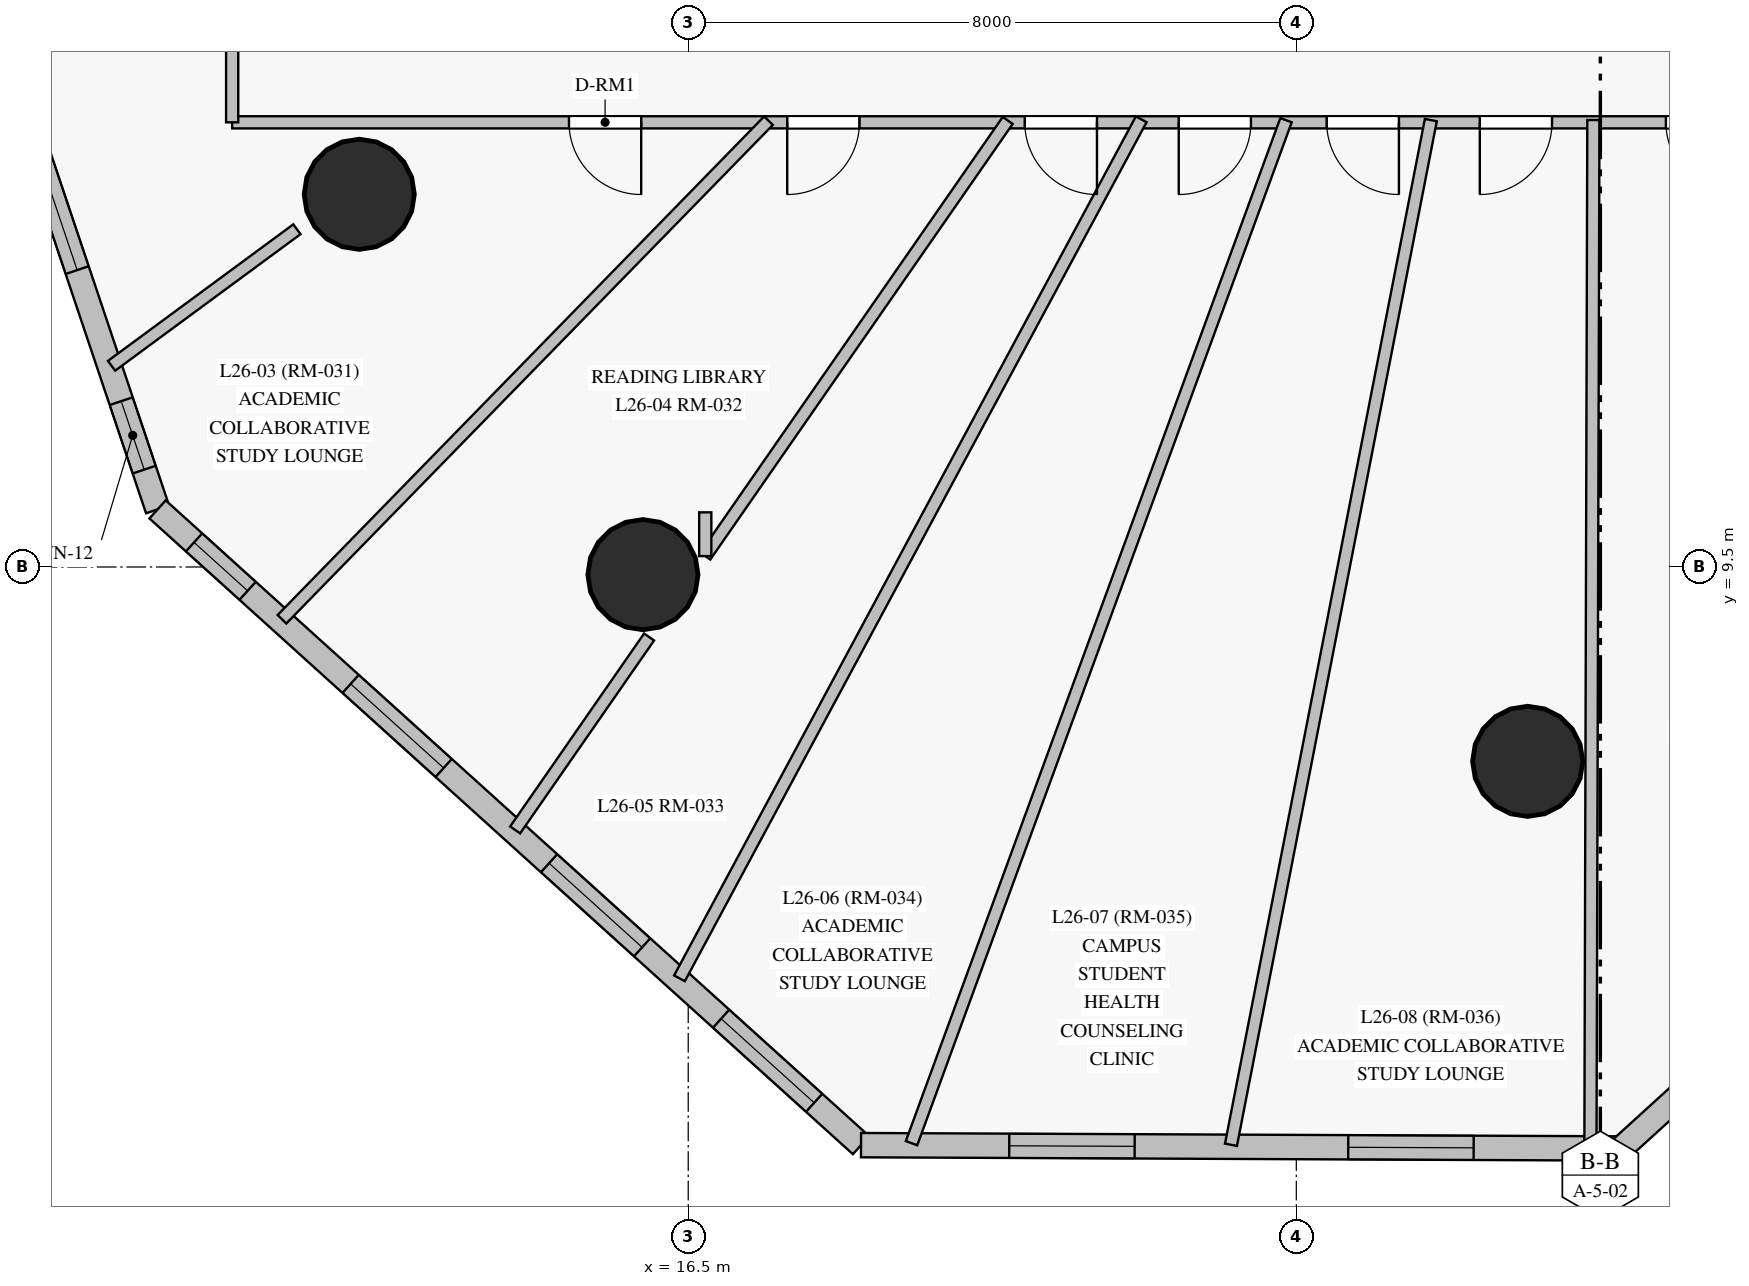
"""IFC4 building model, lengths in metres.
Left out: names, types, materials, properties, quantities, classifications, styles, units other than length and angle.
Written with IfcOpenShell. Run it as: python <this file> out.ifc"""

import sys

from ifc_helpers import new_model, si_unit, direction, frame, frame_2d, origin, origin_with_axes, origin_2d, place, context, subcontext, project, spatial, rectangle, circle, extrude, source, transform, mapped, element, fill, save


model = new_model("IFC4")
c1 = context("Model", 3, precision=1e-05, world=origin(), true_north=direction((0.0, 1.0)))
c2 = subcontext(c1, "Body", "Model", "MODEL_VIEW")
j1 = project(units=[si_unit("LENGTHUNIT", "METRE"), si_unit("PLANEANGLEUNIT", "RADIAN")], contexts=[c1])
p1 = place(None, origin())
s1 = spatial("IfcSite", under=j1, at=p1, CompositionType="ELEMENT")
p2 = place(p1, origin())
s2 = spatial("IfcBuilding", under=s1, at=p2, CompositionType="ELEMENT")
p3 = place(p2, frame((0.0, 0.0, 99.25)))
s3 = spatial("IfcBuildingStorey", under=s2, at=p3, CompositionType="ELEMENT", Elevation=99.25)
m1 = source(origin_with_axes(), c2, "Body", "SweptSolid", [
    extrude(circle(Radius=0.725, at=origin_2d()), origin(), (0.0, 0.0, 1.0), 3.05),
])
for number, where, z_axis, x_axis in (
    (1, (12.172, 14.403, 0.0), (0.0, 0.0, 1.0), (1.0, 0.0, 0.0)),
    (2, (15.904, 9.399, 0.0), (0.0, 0.0, 1.0), (1.0, 0.0, 0.0)),
    (3, (27.544, 6.943, 0.0), (0.0, 0.0, 1.0), (1.0, 0.0, 0.0)),
):
    element("IfcColumn", number, at=place(p3, frame(where, z_axis=z_axis, x_axis=x_axis)), inside=s3, PredefinedType="COLUMN", context=c2, shape_type="MappedRepresentation", body=[
        mapped(m1, transform((0.0, 0.0, 0.0), scale=1.0)),
    ])
p4 = place(p3, frame((6.327, 19.757, 0.0), z_axis=(0.0, 0.0, 1.0), x_axis=(0.318478051642, -0.947930235103, 0.0)))
e4 = element("IfcWall", 4, at=p4, inside=s3, PredefinedType="SOLIDWALL", context=c2, shape_type="SweptSolid", body=[
    extrude(rectangle(XDim=10.021, YDim=0.32, at=frame_2d((5.01, 0.0))), origin(), (0.0, 0.0, 1.0), 2.825),
])
p5 = place(p4, frame((1.387, 0.0, 0.85)))
e5 = element("IfcOpeningElement", 5, at=p5, cuts=e4, PredefinedType="OPENING", context=c2, shape_type="SweptSolid", body=[
    extrude(rectangle(XDim=1.65, YDim=1.65, at=frame_2d((0.825, 0.825))), frame((0.0, 0.17, 0.0), z_axis=(0.0, -1.0, 0.0), x_axis=(1.0, 0.0, 0.0)), (0.0, 0.0, 1.0), 0.34),
])
p6 = place(p4, frame((5.05, 0.0, 0.85)))
e6 = element("IfcOpeningElement", 6, at=p6, cuts=e4, PredefinedType="OPENING", context=c2, shape_type="SweptSolid", body=[
    extrude(rectangle(XDim=1.65, YDim=1.65, at=frame_2d((0.825, 0.825))), frame((0.0, 0.17, 0.0), z_axis=(0.0, -1.0, 0.0), x_axis=(1.0, 0.0, 0.0)), (0.0, 0.0, 1.0), 0.34),
])
p7 = place(p4, frame((8.519, 0.0, 0.85)))
e7 = element("IfcOpeningElement", 7, at=p7, cuts=e4, PredefinedType="OPENING", context=c2, shape_type="SweptSolid", body=[
    extrude(rectangle(XDim=0.95, YDim=1.5, at=frame_2d((0.475, 0.75))), frame((0.0, 0.17, 0.0), z_axis=(0.0, -1.0, 0.0), x_axis=(1.0, 0.0, 0.0)), (0.0, 0.0, 1.0), 0.34),
])
p8 = place(p3, frame((9.519, 10.258, 0.0), z_axis=(0.0, 0.0, 1.0), x_axis=(0.74192235479, -0.670485808547, 0.0)))
e8 = element("IfcWall", 8, at=p8, inside=s3, PredefinedType="SOLIDWALL", context=c2, shape_type="SweptSolid", body=[
    extrude(rectangle(XDim=12.474, YDim=0.32, at=frame_2d((6.237, 0.0))), origin(), (0.0, 0.0, 1.0), 2.825),
])
p9 = place(p8, frame((0.647, 0.0, 0.85)))
e9 = element("IfcOpeningElement", 9, at=p9, cuts=e8, PredefinedType="OPENING", context=c2, shape_type="SweptSolid", body=[
    extrude(rectangle(XDim=0.95, YDim=1.5, at=frame_2d((0.475, 0.75))), frame((0.0, 0.17, 0.0), z_axis=(0.0, -1.0, 0.0), x_axis=(1.0, 0.0, 0.0)), (0.0, 0.0, 1.0), 0.34),
])
p10 = place(p8, frame((3.424, 0.0, 0.85)))
e10 = element("IfcOpeningElement", 10, at=p10, cuts=e8, PredefinedType="OPENING", context=c2, shape_type="SweptSolid", body=[
    extrude(rectangle(XDim=1.65, YDim=1.65, at=frame_2d((0.825, 0.825))), frame((0.0, 0.17, 0.0), z_axis=(0.0, -1.0, 0.0), x_axis=(1.0, 0.0, 0.0)), (0.0, 0.0, 1.0), 0.34),
])
p11 = place(p8, frame((6.943, 0.0, 0.85)))
e11 = element("IfcOpeningElement", 11, at=p11, cuts=e8, PredefinedType="OPENING", context=c2, shape_type="SweptSolid", body=[
    extrude(rectangle(XDim=1.65, YDim=1.65, at=frame_2d((0.825, 0.825))), frame((0.0, 0.17, 0.0), z_axis=(0.0, -1.0, 0.0), x_axis=(1.0, 0.0, 0.0)), (0.0, 0.0, 1.0), 0.34),
])
p12 = place(p8, frame((9.993, 0.0, 0.85)))
e12 = element("IfcOpeningElement", 12, at=p12, cuts=e8, PredefinedType="OPENING", context=c2, shape_type="SweptSolid", body=[
    extrude(rectangle(XDim=1.65, YDim=1.65, at=frame_2d((0.825, 0.825))), frame((0.0, 0.17, 0.0), z_axis=(0.0, -1.0, 0.0), x_axis=(1.0, 0.0, 0.0)), (0.0, 0.0, 1.0), 0.34),
])
p13 = place(p3, frame((18.773, 1.894, 0.0), z_axis=(0.0, 0.0, 1.0), x_axis=(0.999990449776, -0.004370395549, 0.0)))
e13 = element("IfcWall", 13, at=p13, inside=s3, PredefinedType="SOLIDWALL", context=c2, shape_type="SweptSolid", body=[
    extrude(rectangle(XDim=9.999, YDim=0.32, at=frame_2d((5.0, 0.0))), origin(), (0.0, 0.0, 1.0), 2.825),
])
p14 = place(p13, frame((1.95, 0.0, 0.85)))
e14 = element("IfcOpeningElement", 14, at=p14, cuts=e13, PredefinedType="OPENING", context=c2, shape_type="SweptSolid", body=[
    extrude(rectangle(XDim=1.65, YDim=1.65, at=frame_2d((0.825, 0.825))), frame((0.0, 0.17, 0.0), z_axis=(0.0, -1.0, 0.0), x_axis=(1.0, 0.0, 0.0)), (0.0, 0.0, 1.0), 0.34),
])
p15 = place(p13, frame((6.41, 0.0, 0.85)))
e15 = element("IfcOpeningElement", 15, at=p15, cuts=e13, PredefinedType="OPENING", context=c2, shape_type="SweptSolid", body=[
    extrude(rectangle(XDim=1.65, YDim=1.65, at=frame_2d((0.825, 0.825))), frame((0.0, 0.17, 0.0), z_axis=(0.0, -1.0, 0.0), x_axis=(1.0, 0.0, 0.0)), (0.0, 0.0, 1.0), 0.34),
])
p16 = place(p3, frame((28.773, 1.85, 0.0), z_axis=(0.0, 0.0, 1.0), x_axis=(0.739889815612, 0.672728073409, 0.0)))
e16 = element("IfcWall", 16, at=p16, inside=s3, PredefinedType="SOLIDWALL", context=c2, shape_type="SweptSolid", body=[
    extrude(rectangle(XDim=14.948, YDim=0.32, at=frame_2d((7.474, 0.0))), origin(), (0.0, 0.0, 1.0), 2.825),
])
p17 = place(p16, frame((2.629, 0.0, 0.85)))
e17 = element("IfcOpeningElement", 17, at=p17, cuts=e16, PredefinedType="OPENING", context=c2, shape_type="SweptSolid", body=[
    extrude(rectangle(XDim=1.65, YDim=1.65, at=frame_2d((0.825, 0.825))), frame((0.0, 0.17, 0.0), z_axis=(0.0, -1.0, 0.0), x_axis=(1.0, 0.0, 0.0)), (0.0, 0.0, 1.0), 0.34),
])
p18 = place(p16, frame((8.063, 0.0, 0.85)))
e18 = element("IfcOpeningElement", 18, at=p18, cuts=e16, PredefinedType="OPENING", context=c2, shape_type="SweptSolid", body=[
    extrude(rectangle(XDim=1.65, YDim=1.65, at=frame_2d((0.825, 0.825))), frame((0.0, 0.17, 0.0), z_axis=(0.0, -1.0, 0.0), x_axis=(1.0, 0.0, 0.0)), (0.0, 0.0, 1.0), 0.34),
])
p19 = place(p16, frame((11.502, 0.0, 0.85)))
e19 = element("IfcOpeningElement", 19, at=p19, cuts=e16, PredefinedType="OPENING", context=c2, shape_type="SweptSolid", body=[
    extrude(rectangle(XDim=1.65, YDim=1.65, at=frame_2d((0.825, 0.825))), frame((0.0, 0.17, 0.0), z_axis=(0.0, -1.0, 0.0), x_axis=(1.0, 0.0, 0.0)), (0.0, 0.0, 1.0), 0.34),
])
p20 = place(p3, frame((40.25, 15.35, 0.0), z_axis=(0.0, 0.0, 1.0), x_axis=(-1.0, 0.0, 0.0)))
e20 = element("IfcWall", 20, at=p20, inside=s3, PredefinedType="PARTITIONING", context=c2, shape_type="SweptSolid", body=[
    extrude(rectangle(XDim=29.75, YDim=0.16, at=frame_2d((14.875, 0.0))), origin(), (0.0, 0.0, 1.0), 2.225),
])
p21 = place(p20, frame((24.369, 0.0, 0.0)))
e21 = element("IfcOpeningElement", 21, at=p21, cuts=e20, PredefinedType="OPENING", context=c2, shape_type="SweptSolid", body=[
    extrude(rectangle(XDim=0.95, YDim=2.15, at=frame_2d((0.475, 1.075))), frame((0.0, 0.09, 0.0), z_axis=(0.0, -1.0, 0.0), x_axis=(1.0, 0.0, 0.0)), (0.0, 0.0, 1.0), 0.18),
])
p22 = place(p20, frame((21.498, 0.0, 0.0)))
e22 = element("IfcOpeningElement", 22, at=p22, cuts=e20, PredefinedType="OPENING", context=c2, shape_type="SweptSolid", body=[
    extrude(rectangle(XDim=0.95, YDim=2.15, at=frame_2d((0.475, 1.075))), frame((0.0, 0.09, 0.0), z_axis=(0.0, -1.0, 0.0), x_axis=(1.0, 0.0, 0.0)), (0.0, 0.0, 1.0), 0.18),
])
p23 = place(p20, frame((18.373, 0.0, 0.0)))
e23 = element("IfcOpeningElement", 23, at=p23, cuts=e20, PredefinedType="OPENING", context=c2, shape_type="SweptSolid", body=[
    extrude(rectangle(XDim=0.95, YDim=2.15, at=frame_2d((0.475, 1.075))), frame((0.0, 0.09, 0.0), z_axis=(0.0, -1.0, 0.0), x_axis=(1.0, 0.0, 0.0)), (0.0, 0.0, 1.0), 0.18),
])
p24 = place(p20, frame((16.347, 0.0, 0.0)))
e24 = element("IfcOpeningElement", 24, at=p24, cuts=e20, PredefinedType="OPENING", context=c2, shape_type="SweptSolid", body=[
    extrude(rectangle(XDim=0.95, YDim=2.15, at=frame_2d((0.475, 1.075))), frame((0.0, 0.09, 0.0), z_axis=(0.0, -1.0, 0.0), x_axis=(1.0, 0.0, 0.0)), (0.0, 0.0, 1.0), 0.18),
])
p25 = place(p20, frame((14.4, 0.0, 0.0)))
e25 = element("IfcOpeningElement", 25, at=p25, cuts=e20, PredefinedType="OPENING", context=c2, shape_type="SweptSolid", body=[
    extrude(rectangle(XDim=0.95, YDim=2.15, at=frame_2d((0.475, 1.075))), frame((0.0, 0.09, 0.0), z_axis=(0.0, -1.0, 0.0), x_axis=(1.0, 0.0, 0.0)), (0.0, 0.0, 1.0), 0.18),
])
p26 = place(p20, frame((12.386, 0.0, 0.0)))
e26 = element("IfcOpeningElement", 26, at=p26, cuts=e20, PredefinedType="OPENING", context=c2, shape_type="SweptSolid", body=[
    extrude(rectangle(XDim=0.95, YDim=2.15, at=frame_2d((0.475, 1.075))), frame((0.0, 0.09, 0.0), z_axis=(0.0, -1.0, 0.0), x_axis=(1.0, 0.0, 0.0)), (0.0, 0.0, 1.0), 0.18),
])
p27 = place(p20, frame((9.938, 0.0, 0.0)))
e27 = element("IfcOpeningElement", 27, at=p27, cuts=e20, PredefinedType="OPENING", context=c2, shape_type="SweptSolid", body=[
    extrude(rectangle(XDim=0.95, YDim=2.15, at=frame_2d((0.475, 1.075))), frame((0.0, 0.09, 0.0), z_axis=(0.0, -1.0, 0.0), x_axis=(1.0, 0.0, 0.0)), (0.0, 0.0, 1.0), 0.18),
])
p28 = place(p20, frame((6.962, 0.0, 0.0)))
e28 = element("IfcOpeningElement", 28, at=p28, cuts=e20, PredefinedType="OPENING", context=c2, shape_type="SweptSolid", body=[
    extrude(rectangle(XDim=0.95, YDim=2.15, at=frame_2d((0.475, 1.075))), frame((0.0, 0.09, 0.0), z_axis=(0.0, -1.0, 0.0), x_axis=(1.0, 0.0, 0.0)), (0.0, 0.0, 1.0), 0.18),
])
p29 = place(p3, frame((10.5, 15.35, 0.0), z_axis=(0.0, 0.0, 1.0), x_axis=(0.0, 1.0, 0.0)))
e29 = element("IfcWall", 29, at=p29, inside=s3, PredefinedType="PARTITIONING", context=c2, shape_type="SweptSolid", body=[
    extrude(rectangle(XDim=22.138, YDim=0.16, at=frame_2d((11.069, 0.0))), origin(), (0.0, 0.0, 1.0), 2.825),
])
p30 = place(p29, frame((5.021, 0.0, 0.0)))
e30 = element("IfcOpeningElement", 30, at=p30, cuts=e29, PredefinedType="OPENING", context=c2, shape_type="SweptSolid", body=[
    extrude(rectangle(XDim=0.96, YDim=2.15, at=frame_2d((0.48, 1.075))), frame((0.0, 0.09, 0.0), z_axis=(0.0, -1.0, 0.0), x_axis=(1.0, 0.0, 0.0)), (0.0, 0.0, 1.0), 0.18),
])
p31 = place(p29, frame((10.518, 0.0, 0.0)))
e31 = element("IfcOpeningElement", 31, at=p31, cuts=e29, PredefinedType="OPENING", context=c2, shape_type="SweptSolid", body=[
    extrude(rectangle(XDim=0.95, YDim=2.15, at=frame_2d((0.475, 1.075))), frame((0.0, 0.09, 0.0), z_axis=(0.0, -1.0, 0.0), x_axis=(1.0, 0.0, 0.0)), (0.0, 0.0, 1.0), 0.18),
])
p32 = place(p3, frame((24.365, 15.378, 0.0), z_axis=(0.0, 0.0, 1.0), x_axis=(-0.343761077949, -0.939057144847, 0.0)))
e32 = element("IfcWall", 32, at=p32, inside=s3, PredefinedType="PARTITIONING", context=c2, shape_type="SweptSolid", body=[
    extrude(rectangle(XDim=14.332, YDim=0.16, at=frame_2d((7.166, 0.0))), origin(), (0.0, 0.0, 1.0), 2.825),
])
p33 = place(p3, frame((26.27, 15.379, 0.0), z_axis=(0.0, 0.0, 1.0), x_axis=(-0.191458153646, -0.981500777077, 0.0)))
e33 = element("IfcWall", 33, at=p33, inside=s3, PredefinedType="PARTITIONING", context=c2, shape_type="SweptSolid", body=[
    extrude(rectangle(XDim=13.735, YDim=0.16, at=frame_2d((6.867, 0.0))), origin(), (0.0, 0.0, 1.0), 2.225),
])
p34 = place(p3, frame((28.408, 15.38, 0.0), z_axis=(0.0, 0.0, 1.0), x_axis=(-0.002856666281, -0.999995919721, 0.0)))
e34 = element("IfcWall", 34, at=p34, inside=s3, PredefinedType="PARTITIONING", context=c2, shape_type="SweptSolid", body=[
    extrude(rectangle(XDim=13.503, YDim=0.16, at=frame_2d((6.751, 0.0))), origin(), (0.0, 0.0, 1.0), 2.825),
])
p35 = place(p3, frame((22.46, 15.39, 0.0), z_axis=(0.0, 0.0, 1.0), x_axis=(-0.473459721756, -0.88081546982, 0.0)))
e35 = element("IfcWall", 35, at=p35, inside=s3, PredefinedType="PARTITIONING", context=c2, shape_type="SweptSolid", body=[
    extrude(rectangle(XDim=12.831, YDim=0.16, at=frame_2d((6.415, 0.0))), origin(), (0.0, 0.0, 1.0), 2.825),
])
p36 = place(p3, frame((17.556, 15.372, 0.0), z_axis=(0.0, 0.0, 1.0), x_axis=(-0.698423045648, -0.715685160743, 0.0)))
e36 = element("IfcWall", 36, at=p36, inside=s3, PredefinedType="PARTITIONING", context=c2, shape_type="SweptSolid", body=[
    extrude(rectangle(XDim=9.165, YDim=0.16, at=frame_2d((4.583, 0.0))), origin(), (0.0, 0.0, 1.0), 2.825),
])
p37 = place(p3, frame((20.703, 15.375, 0.0), z_axis=(0.0, 0.0, 1.0), x_axis=(-0.570299409109, -0.821436902002, 0.0)))
e37 = element("IfcWall", 37, at=p37, inside=s3, PredefinedType="PARTITIONING", context=c2, shape_type="SweptSolid", body=[
    extrude(rectangle(XDim=6.977, YDim=0.16, at=frame_2d((3.489, 0.0))), origin(), (0.0, 0.0, 1.0), 2.825),
])
p38 = place(p3, frame((15.985, 8.579, 0.0), z_axis=(0.0, 0.0, 1.0), x_axis=(-0.570244784971, -0.821474823238, 0.0)))
e38 = element("IfcWall", 38, at=p38, inside=s3, PredefinedType="PARTITIONING", context=c2, shape_type="SweptSolid", body=[
    extrude(rectangle(XDim=3.09, YDim=0.16, at=frame_2d((1.545, 0.0))), origin(), (0.0, 0.0, 1.0), 2.825),
])
p39 = place(p3, frame((11.352, 13.943, 0.0), z_axis=(0.0, 0.0, 1.0), x_axis=(-0.805183458548, -0.593025798832, 0.0)))
e39 = element("IfcWall", 39, at=p39, inside=s3, PredefinedType="PARTITIONING", context=c2, shape_type="SweptSolid", body=[
    extrude(rectangle(XDim=3.029, YDim=0.16, at=frame_2d((1.514, 0.0))), origin(), (0.0, 0.0, 1.0), 2.825),
])
p40 = place(p3, frame((16.724, 9.643, 0.0), z_axis=(0.0, 0.0, 1.0), x_axis=(0.0, 1.0, 0.0)))
e40 = element("IfcWall", 40, at=p40, inside=s3, PredefinedType="PARTITIONING", context=c2, shape_type="SweptSolid", body=[
    extrude(rectangle(XDim=0.576, YDim=0.16, at=frame_2d((0.288, 0.0))), origin(), (0.0, 0.0, 1.0), 2.225),
])
m2 = source(origin_with_axes(), c2, "Body", "SweptSolid", [
    extrude(rectangle(XDim=1.65, YDim=1.65, at=frame_2d((0.825, 0.825))), frame((0.0, 0.03, 0.0), z_axis=(0.0, -1.0, 0.0), x_axis=(1.0, 0.0, 0.0)), (0.0, 0.0, 1.0), 0.06),
])
p41 = place(p6, origin())
e41 = element("IfcWindow", 41, at=p41, inside=s3, PartitioningType="SINGLE_PANEL", PredefinedType="WINDOW", context=c2, shape_type="MappedRepresentation", body=[
    mapped(m2, transform((0.0, 0.0, 0.0), scale=1.0)),
])
fill(e6, e41)
m3 = source(origin_with_axes(), c2, "Body", "SweptSolid", [
    extrude(rectangle(XDim=0.95, YDim=1.5, at=frame_2d((0.475, 0.75))), frame((0.0, 0.03, 0.0), z_axis=(0.0, -1.0, 0.0), x_axis=(1.0, 0.0, 0.0)), (0.0, 0.0, 1.0), 0.06),
])
p42 = place(p7, origin())
e42 = element("IfcWindow", 42, at=p42, inside=s3, PartitioningType="SINGLE_PANEL", PredefinedType="WINDOW", context=c2, shape_type="MappedRepresentation", body=[
    mapped(m3, transform((0.0, 0.0, 0.0), scale=1.0)),
])
fill(e7, e42)
p43 = place(p9, origin())
e43 = element("IfcWindow", 43, at=p43, inside=s3, PartitioningType="SINGLE_PANEL", PredefinedType="WINDOW", context=c2, shape_type="MappedRepresentation", body=[
    mapped(m3, transform((0.0, 0.0, 0.0), scale=1.0)),
])
fill(e9, e43)
p44 = place(p10, origin())
e44 = element("IfcWindow", 44, at=p44, inside=s3, PartitioningType="SINGLE_PANEL", PredefinedType="WINDOW", context=c2, shape_type="MappedRepresentation", body=[
    mapped(m2, transform((0.0, 0.0, 0.0), scale=1.0)),
])
fill(e10, e44)
p45 = place(p11, origin())
e45 = element("IfcWindow", 45, at=p45, inside=s3, PartitioningType="SINGLE_PANEL", PredefinedType="WINDOW", context=c2, shape_type="MappedRepresentation", body=[
    mapped(m2, transform((0.0, 0.0, 0.0), scale=1.0)),
])
fill(e11, e45)
p46 = place(p12, origin())
e46 = element("IfcWindow", 46, at=p46, inside=s3, PartitioningType="SINGLE_PANEL", PredefinedType="WINDOW", context=c2, shape_type="MappedRepresentation", body=[
    mapped(m2, transform((0.0, 0.0, 0.0), scale=1.0)),
])
fill(e12, e46)
p47 = place(p14, origin())
e47 = element("IfcWindow", 47, at=p47, inside=s3, PartitioningType="SINGLE_PANEL", PredefinedType="WINDOW", context=c2, shape_type="MappedRepresentation", body=[
    mapped(m2, transform((0.0, 0.0, 0.0), scale=1.0)),
])
fill(e14, e47)
p48 = place(p15, origin())
e48 = element("IfcWindow", 48, at=p48, inside=s3, PartitioningType="SINGLE_PANEL", PredefinedType="WINDOW", context=c2, shape_type="MappedRepresentation", body=[
    mapped(m2, transform((0.0, 0.0, 0.0), scale=1.0)),
])
fill(e15, e48)
m4 = source(origin_with_axes(), c2, "Body", "SweptSolid", [
    extrude(rectangle(XDim=0.95, YDim=2.15, at=frame_2d((0.475, 1.075))), frame((0.0, 0.025, 0.0), z_axis=(0.0, -1.0, 0.0), x_axis=(1.0, 0.0, 0.0)), (0.0, 0.0, 1.0), 0.05),
])
p49 = place(p21, origin())
e49 = element("IfcDoor", 49, at=p49, inside=s3, OperationType="SINGLE_SWING_LEFT", PredefinedType="DOOR", context=c2, shape_type="MappedRepresentation", body=[
    mapped(m4, transform((0.0, 0.0, 0.0), scale=1.0)),
])
fill(e21, e49)
p50 = place(p22, origin())
e50 = element("IfcDoor", 50, at=p50, inside=s3, OperationType="SINGLE_SWING_RIGHT", PredefinedType="DOOR", context=c2, shape_type="MappedRepresentation", body=[
    mapped(m4, transform((0.0, 0.0, 0.0), scale=1.0)),
])
fill(e22, e50)
p51 = place(p23, origin())
e51 = element("IfcDoor", 51, at=p51, inside=s3, OperationType="SINGLE_SWING_LEFT", PredefinedType="DOOR", context=c2, shape_type="MappedRepresentation", body=[
    mapped(m4, transform((0.0, 0.0, 0.0), scale=1.0)),
])
fill(e23, e51)
p52 = place(p24, origin())
e52 = element("IfcDoor", 52, at=p52, inside=s3, OperationType="SINGLE_SWING_RIGHT", PredefinedType="DOOR", context=c2, shape_type="MappedRepresentation", body=[
    mapped(m4, transform((0.0, 0.0, 0.0), scale=1.0)),
])
fill(e24, e52)
p53 = place(p25, origin())
e53 = element("IfcDoor", 53, at=p53, inside=s3, OperationType="SINGLE_SWING_LEFT", PredefinedType="DOOR", context=c2, shape_type="MappedRepresentation", body=[
    mapped(m4, transform((0.0, 0.0, 0.0), scale=1.0)),
])
fill(e25, e53)
p54 = place(p26, origin())
e54 = element("IfcDoor", 54, at=p54, inside=s3, OperationType="SINGLE_SWING_RIGHT", PredefinedType="DOOR", context=c2, shape_type="MappedRepresentation", body=[
    mapped(m4, transform((0.0, 0.0, 0.0), scale=1.0)),
])
fill(e26, e54)
p55 = place(p27, origin())
e55 = element("IfcDoor", 55, at=p55, inside=s3, OperationType="SINGLE_SWING_LEFT", PredefinedType="DOOR", context=c2, shape_type="MappedRepresentation", body=[
    mapped(m4, transform((0.0, 0.0, 0.0), scale=1.0)),
])
fill(e27, e55)
save(model, sys.argv[1])
